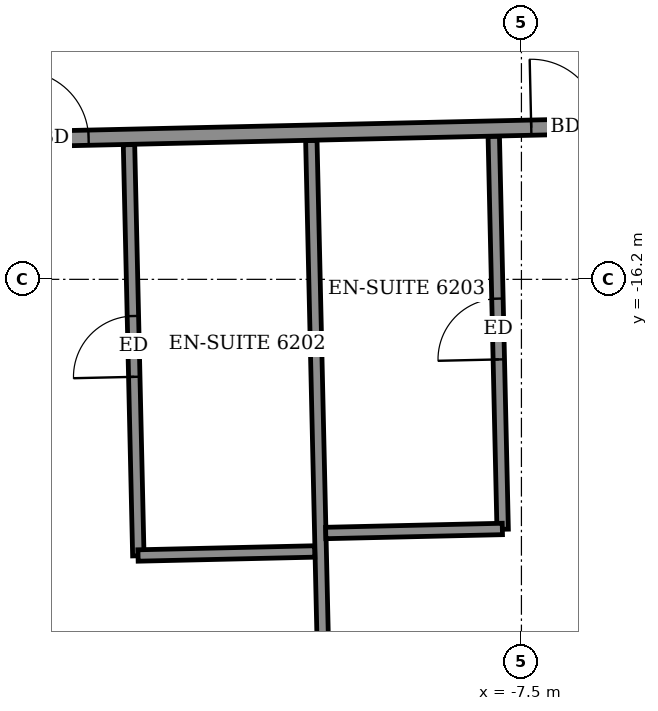
"""IFC4 building model, lengths in metres.
Left out: names, types, materials, properties, quantities, classifications, styles, units other than length and angle.
Written with IfcOpenShell. Run it as: python <this file> out.ifc"""

import sys

from ifc_helpers import new_model, si_unit, direction, frame, frame_2d, origin, place, context, subcontext, project, spatial, rectangle, extrude, element, fill, save


model = new_model("IFC4")
c1 = context("Model", 3, precision=1e-05, world=origin(), true_north=direction((0.0, 1.0)))
c2 = subcontext(c1, "Body", "Model", "MODEL_VIEW")
j1 = project(units=[si_unit("LENGTHUNIT", "METRE"), si_unit("PLANEANGLEUNIT", "RADIAN")], contexts=[c1])
p1 = place(None, origin())
s1 = spatial("IfcSite", under=j1, at=p1, CompositionType="ELEMENT")
p2 = place(p1, origin())
s2 = spatial("IfcBuilding", under=s1, at=p2, CompositionType="ELEMENT")
p3 = place(p2, frame((0.0, 0.0, 245.5)))
s3 = spatial("IfcBuildingStorey", under=s2, at=p3, CompositionType="ELEMENT", Elevation=245.5)
p4 = place(p3, frame((-10.005, -25.747, 0.0), z_axis=(0.0, 0.0, 1.0), x_axis=(-0.022770155219, 0.999740726404, 0.0)))
e1 = element("IfcWall", 1, at=p4, inside=s3, PredefinedType="PARTITIONING", context=c2, shape_type="SweptSolid", body=[
    extrude(rectangle(XDim=11.376, YDim=0.15, at=frame_2d((5.688, 0.0))), origin(), (0.0, 0.0, 1.0), 2.5),
])
p5 = place(p3, frame((-12.54, -19.837, 0.0), z_axis=(0.0, 0.0, 1.0), x_axis=(-0.022742931096, 0.999741346092, 0.0)))
e2 = element("IfcWall", 2, at=p5, inside=s3, PredefinedType="PARTITIONING", context=c2, shape_type="SweptSolid", body=[
    extrude(rectangle(XDim=5.41, YDim=0.15, at=frame_2d((2.705, 0.0))), origin(), (0.0, 0.0, 1.0), 3.05),
])
p6 = place(p5, frame((2.355, 0.0, 0.0)))
e3 = element("IfcOpeningElement", 3, at=p6, cuts=e2, PredefinedType="OPENING", context=c2, shape_type="SweptSolid", body=[
    extrude(rectangle(XDim=0.8, YDim=2.1, at=frame_2d((0.4, 1.05))), frame((0.0, 0.085, 0.0), z_axis=(0.0, -1.0, 0.0), x_axis=(1.0, 0.0, 0.0)), (0.0, 0.0, 1.0), 0.17),
])
p7 = place(p3, frame((-12.544, -19.833, 0.0), z_axis=(0.0, 0.0, 1.0), x_axis=(0.999740260747, 0.02279059109, 0.0)))
e4 = element("IfcWall", 4, at=p7, inside=s3, PredefinedType="PARTITIONING", context=c2, shape_type="SweptSolid", body=[
    extrude(rectangle(XDim=2.324, YDim=0.15, at=frame_2d((1.162, 0.0))), origin(), (0.0, 0.0, 1.0), 3.05),
])
p8 = place(p3, frame((-7.747, -19.488, 0.0), z_axis=(0.0, 0.0, 1.0), x_axis=(-0.022618432726, 0.999744170526, 0.0)))
e5 = element("IfcWall", 5, at=p8, inside=s3, PredefinedType="PARTITIONING", context=c2, shape_type="SweptSolid", body=[
    extrude(rectangle(XDim=5.17, YDim=0.15, at=frame_2d((2.585, 0.0))), origin(), (0.0, 0.0, 1.0), 3.05),
])
p9 = place(p8, frame((2.235, 0.0, 0.0)))
e6 = element("IfcOpeningElement", 6, at=p9, cuts=e5, PredefinedType="OPENING", context=c2, shape_type="SweptSolid", body=[
    extrude(rectangle(XDim=0.8, YDim=2.1, at=frame_2d((0.4, 1.05))), frame((0.0, 0.085, 0.0), z_axis=(0.0, -1.0, 0.0), x_axis=(1.0, 0.0, 0.0)), (0.0, 0.0, 1.0), 0.17),
])
p10 = place(p3, frame((-10.075, -19.537, 0.0), z_axis=(0.0, 0.0, 1.0), x_axis=(0.999737862264, 0.022895561926, 0.0)))
e7 = element("IfcWall", 7, at=p10, inside=s3, PredefinedType="PARTITIONING", context=c2, shape_type="SweptSolid", body=[
    extrude(rectangle(XDim=2.324, YDim=0.15, at=frame_2d((1.162, 0.0))), origin(), (0.0, 0.0, 1.0), 3.05),
])
p11 = place(p3, frame((-27.016, -14.65, 0.0), z_axis=(0.0, 0.0, 1.0), x_axis=(0.999742874861, 0.022675629315, 0.0)))
e8 = element("IfcWall", 8, at=p11, inside=s3, PredefinedType="PARTITIONING", context=c2, shape_type="SweptSolid", body=[
    extrude(rectangle(XDim=50.883, YDim=0.2, at=frame_2d((25.442, 0.0))), origin(), (0.0, 0.0, 1.0), 3.05),
])
p12 = place(p11, frame((1.575, 0.0, 0.0)))
e9 = element("IfcOpeningElement", 9, at=p12, cuts=e8, PredefinedType="OPENING", context=c2, shape_type="SweptSolid", body=[
    extrude(rectangle(XDim=1.0, YDim=2.1, at=frame_2d((0.5, 1.05))), frame((0.0, 0.11, 0.0), z_axis=(0.0, -1.0, 0.0), x_axis=(1.0, 0.0, 0.0)), (0.0, 0.0, 1.0), 0.22),
])
p13 = place(p11, frame((6.4, 0.0, 0.0)))
e10 = element("IfcOpeningElement", 10, at=p13, cuts=e8, PredefinedType="OPENING", context=c2, shape_type="SweptSolid", body=[
    extrude(rectangle(XDim=0.9, YDim=2.1, at=frame_2d((0.45, 1.05))), frame((0.0, 0.11, 0.0), z_axis=(0.0, -1.0, 0.0), x_axis=(1.0, 0.0, 0.0)), (0.0, 0.0, 1.0), 0.22),
])
p14 = place(p11, frame((11.025, 0.0, 0.0)))
e11 = element("IfcOpeningElement", 11, at=p14, cuts=e8, PredefinedType="OPENING", context=c2, shape_type="SweptSolid", body=[
    extrude(rectangle(XDim=0.9, YDim=2.1, at=frame_2d((0.45, 1.05))), frame((0.0, 0.11, 0.0), z_axis=(0.0, -1.0, 0.0), x_axis=(1.0, 0.0, 0.0)), (0.0, 0.0, 1.0), 0.22),
])
p15 = place(p11, frame((12.925, 0.0, 0.0)))
e12 = element("IfcOpeningElement", 12, at=p15, cuts=e8, PredefinedType="OPENING", context=c2, shape_type="SweptSolid", body=[
    extrude(rectangle(XDim=0.9, YDim=2.1, at=frame_2d((0.45, 1.05))), frame((0.0, 0.11, 0.0), z_axis=(0.0, -1.0, 0.0), x_axis=(1.0, 0.0, 0.0)), (0.0, 0.0, 1.0), 0.22),
])
p16 = place(p11, frame((19.65, 0.0, 0.0)))
e13 = element("IfcOpeningElement", 13, at=p16, cuts=e8, PredefinedType="OPENING", context=c2, shape_type="SweptSolid", body=[
    extrude(rectangle(XDim=0.9, YDim=2.1, at=frame_2d((0.45, 1.05))), frame((0.0, 0.11, 0.0), z_axis=(0.0, -1.0, 0.0), x_axis=(1.0, 0.0, 0.0)), (0.0, 0.0, 1.0), 0.22),
])
p17 = place(p11, frame((21.575, 0.0, 0.0)))
e14 = element("IfcOpeningElement", 14, at=p17, cuts=e8, PredefinedType="OPENING", context=c2, shape_type="SweptSolid", body=[
    extrude(rectangle(XDim=0.9, YDim=2.1, at=frame_2d((0.45, 1.05))), frame((0.0, 0.11, 0.0), z_axis=(0.0, -1.0, 0.0), x_axis=(1.0, 0.0, 0.0)), (0.0, 0.0, 1.0), 0.22),
])
p18 = place(p11, frame((28.25, 0.0, 0.0)))
e15 = element("IfcOpeningElement", 15, at=p18, cuts=e8, PredefinedType="OPENING", context=c2, shape_type="SweptSolid", body=[
    extrude(rectangle(XDim=0.9, YDim=2.1, at=frame_2d((0.45, 1.05))), frame((0.0, 0.11, 0.0), z_axis=(0.0, -1.0, 0.0), x_axis=(1.0, 0.0, 0.0)), (0.0, 0.0, 1.0), 0.22),
])
p19 = place(p11, frame((30.125, 0.0, 0.0)))
e16 = element("IfcOpeningElement", 16, at=p19, cuts=e8, PredefinedType="OPENING", context=c2, shape_type="SweptSolid", body=[
    extrude(rectangle(XDim=0.9, YDim=2.1, at=frame_2d((0.45, 1.05))), frame((0.0, 0.11, 0.0), z_axis=(0.0, -1.0, 0.0), x_axis=(1.0, 0.0, 0.0)), (0.0, 0.0, 1.0), 0.22),
])
p20 = place(p11, frame((36.9, 0.0, 0.0)))
e17 = element("IfcOpeningElement", 17, at=p20, cuts=e8, PredefinedType="OPENING", context=c2, shape_type="SweptSolid", body=[
    extrude(rectangle(XDim=0.9, YDim=2.1, at=frame_2d((0.45, 1.05))), frame((0.0, 0.11, 0.0), z_axis=(0.0, -1.0, 0.0), x_axis=(1.0, 0.0, 0.0)), (0.0, 0.0, 1.0), 0.22),
])
p21 = place(p11, frame((38.85, 0.0, 0.0)))
e18 = element("IfcOpeningElement", 18, at=p21, cuts=e8, PredefinedType="OPENING", context=c2, shape_type="SweptSolid", body=[
    extrude(rectangle(XDim=0.9, YDim=2.1, at=frame_2d((0.45, 1.05))), frame((0.0, 0.11, 0.0), z_axis=(0.0, -1.0, 0.0), x_axis=(1.0, 0.0, 0.0)), (0.0, 0.0, 1.0), 0.22),
])
p22 = place(p11, frame((48.629, 0.0, 0.0)))
e19 = element("IfcOpeningElement", 19, at=p22, cuts=e8, PredefinedType="OPENING", context=c2, shape_type="SweptSolid", body=[
    extrude(rectangle(XDim=1.0, YDim=2.1, at=frame_2d((0.5, 1.05))), frame((0.0, 0.11, 0.0), z_axis=(0.0, -1.0, 0.0), x_axis=(1.0, 0.0, 0.0)), (0.0, 0.0, 1.0), 0.22),
])
p23 = place(p11, frame((43.6, 0.0, 0.0)))
e20 = element("IfcOpeningElement", 20, at=p23, cuts=e8, PredefinedType="OPENING", context=c2, shape_type="SweptSolid", body=[
    extrude(rectangle(XDim=0.9, YDim=2.1, at=frame_2d((0.45, 1.05))), frame((0.0, 0.11, 0.0), z_axis=(0.0, -1.0, 0.0), x_axis=(1.0, 0.0, 0.0)), (0.0, 0.0, 1.0), 0.22),
])
p24 = place(p15, origin())
e21 = element("IfcDoor", 21, at=p24, inside=s3, OperationType="SINGLE_SWING_RIGHT", PredefinedType="DOOR", context=c2, shape_type="SweptSolid", body=[
    extrude(rectangle(XDim=0.9, YDim=2.1, at=frame_2d((0.45, 1.05))), frame((0.0, 0.025, 0.0), z_axis=(0.0, -1.0, 0.0), x_axis=(1.0, 0.0, 0.0)), (0.0, 0.0, 1.0), 0.05),
])
fill(e12, e21)
p25 = place(p6, origin())
e22 = element("IfcDoor", 22, at=p25, inside=s3, OperationType="SINGLE_SWING_RIGHT", PredefinedType="DOOR", context=c2, shape_type="SweptSolid", body=[
    extrude(rectangle(XDim=0.8, YDim=2.1, at=frame_2d((0.4, 1.05))), frame((0.0, 0.025, 0.0), z_axis=(0.0, -1.0, 0.0), x_axis=(1.0, 0.0, 0.0)), (0.0, 0.0, 1.0), 0.05),
])
fill(e3, e22)
p26 = place(p16, origin())
e23 = element("IfcDoor", 23, at=p26, inside=s3, OperationType="SINGLE_SWING_LEFT", PredefinedType="DOOR", context=c2, shape_type="SweptSolid", body=[
    extrude(rectangle(XDim=0.9, YDim=2.1, at=frame_2d((0.45, 1.05))), frame((0.0, 0.025, 0.0), z_axis=(0.0, -1.0, 0.0), x_axis=(1.0, 0.0, 0.0)), (0.0, 0.0, 1.0), 0.05),
])
fill(e13, e23)
p27 = place(p9, origin())
e24 = element("IfcDoor", 24, at=p27, inside=s3, OperationType="SINGLE_SWING_LEFT", PredefinedType="DOOR", context=c2, shape_type="SweptSolid", body=[
    extrude(rectangle(XDim=0.8, YDim=2.1, at=frame_2d((0.4, 1.05))), frame((0.0, 0.025, 0.0), z_axis=(0.0, -1.0, 0.0), x_axis=(1.0, 0.0, 0.0)), (0.0, 0.0, 1.0), 0.05),
])
fill(e6, e24)
save(model, sys.argv[1])
